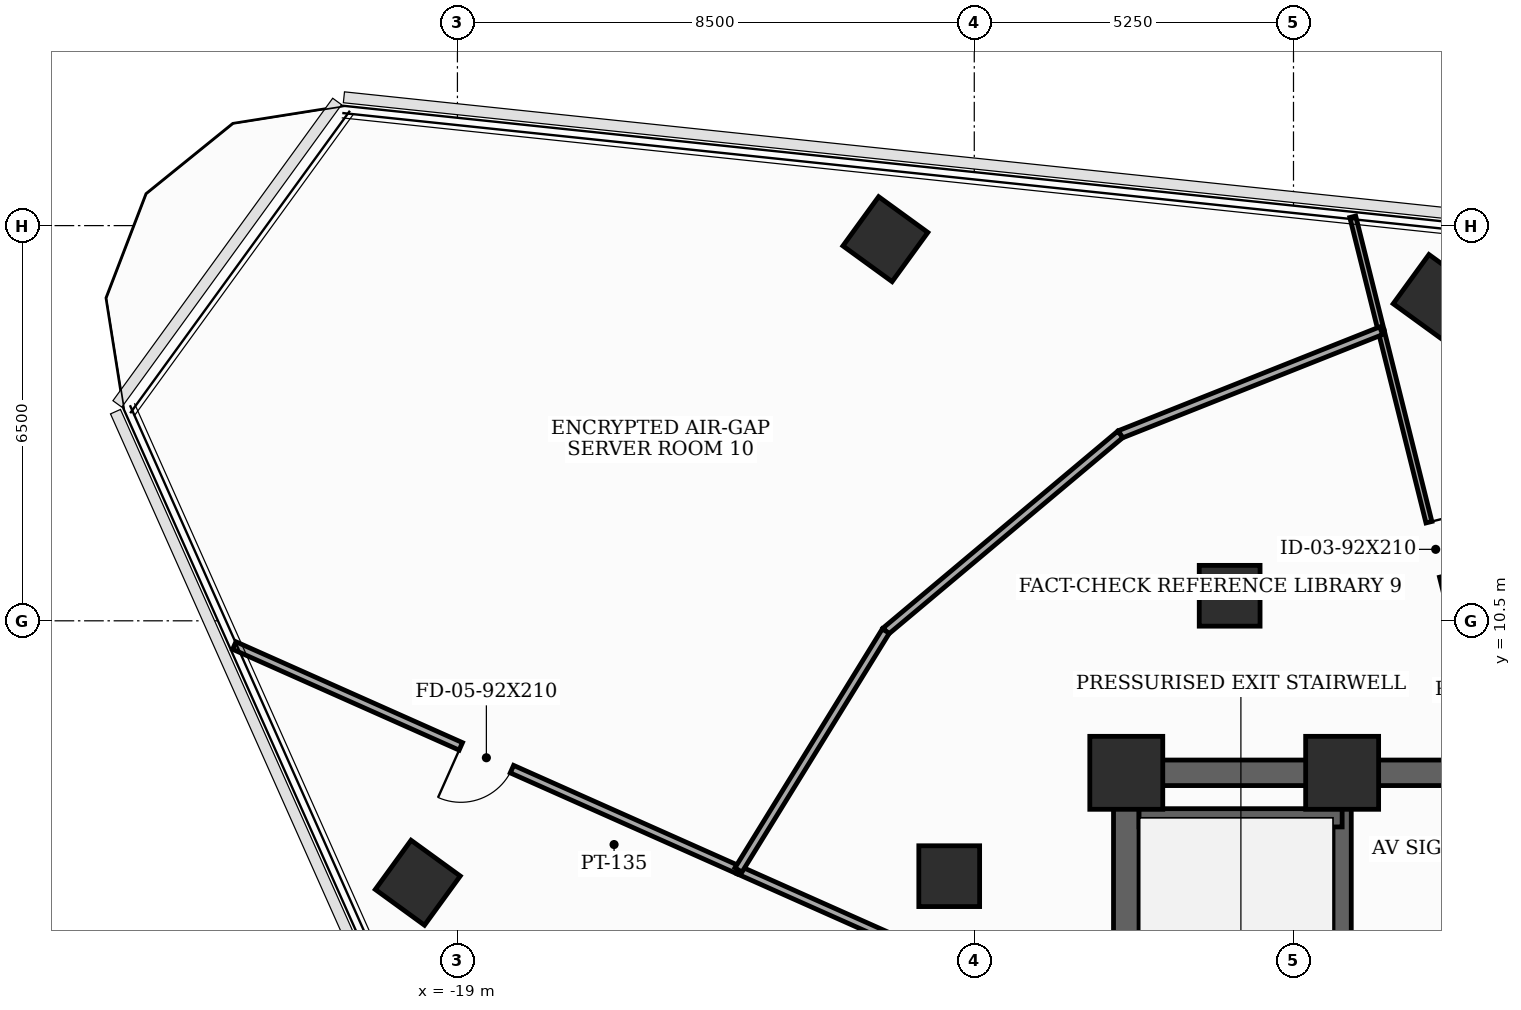
"""IFC4 building model, lengths in metres.
Left out: names, types, materials, properties, quantities, classifications, styles, units other than length and angle.
Written with IfcOpenShell. Run it as: python <this file> out.ifc"""

import sys

from ifc_helpers import new_model, si_unit, direction, frame, frame_2d, origin, origin_2d, place, context, subcontext, project, spatial, rectangle, extrude, element, fill, save


model = new_model("IFC4")
c1 = context("Model", 3, precision=1e-05, world=origin(), true_north=direction((0.0, 1.0)))
c2 = subcontext(c1, "Body", "Model", "MODEL_VIEW")
j1 = project(units=[si_unit("LENGTHUNIT", "METRE"), si_unit("PLANEANGLEUNIT", "RADIAN")], contexts=[c1])
p1 = place(None, origin())
s1 = spatial("IfcSite", under=j1, at=p1, CompositionType="ELEMENT")
p2 = place(p1, origin())
s2 = spatial("IfcBuilding", under=s1, at=p2, CompositionType="ELEMENT")
p3 = place(p2, frame((0.0, 0.0, 237.4)))
s3 = spatial("IfcBuildingStorey", under=s2, at=p3, CompositionType="ELEMENT", Elevation=237.4)
for number, where, z_axis, x_axis in (
    (1, (-4.45, 8.0, 0.0), (0.0, 0.0, 1.0), (1.0, 0.0, 0.0)),
    (2, (-8.0, 8.0, 0.0), (0.0, 0.0, 1.0), (1.0, 0.0, 0.0)),
):
    element("IfcColumn", number, at=place(p3, frame(where, z_axis=z_axis, x_axis=x_axis)), inside=s3, PredefinedType="COLUMN", context=c2, shape_type="SweptSolid", body=[
        extrude(rectangle(XDim=1.2, YDim=1.2, at=origin_2d()), origin(), (0.0, 0.0, 1.0), 3.7),
    ])
for number, where, z_axis, x_axis in (
    (3, (-6.3, 10.912, 0.0), (0.0, 0.0, 1.0), (1.0, 0.0, 0.0)),
    (4, (-10.912, 6.3, 0.0), (0.0, 0.0, 1.0), (1.0, 0.0, 0.0)),
    (5, (-2.912, 15.826, 0.0), (0.0, 0.0, 1.0), (0.588, 0.809, 0.0)),
    (6, (-11.962, 16.777, 0.0), (0.0, 0.0, 1.0), (0.588, 0.809, 0.0)),
    (7, (-19.652, 6.192, 0.0), (0.0, 0.0, 1.0), (0.588, 0.809, 0.0)),
):
    element("IfcColumn", number, at=place(p3, frame(where, z_axis=z_axis, x_axis=x_axis)), inside=s3, PredefinedType="COLUMN", context=c2, shape_type="SweptSolid", body=[
        extrude(rectangle(XDim=1.0, YDim=1.0, at=origin_2d()), origin(), (0.0, 0.0, 1.0), 3.7),
    ])
p4 = place(p3, frame((-8.0, -8.0, 0.0), z_axis=(0.0, 0.0, 1.0), x_axis=(0.0, 1.0, 0.0)))
e8 = element("IfcWall", 8, at=p4, inside=s3, PredefinedType="SHEAR", context=c2, shape_type="SweptSolid", body=[
    extrude(rectangle(XDim=16.0, YDim=0.42, at=frame_2d((8.0, 0.0))), origin(), (0.0, 0.0, 1.0), 3.5),
])
p5 = place(p4, frame((0.761, 0.0, 0.0)))
e9 = element("IfcOpeningElement", 9, at=p5, cuts=e8, PredefinedType="OPENING", context=c2, shape_type="SweptSolid", body=[
    extrude(rectangle(XDim=0.85, YDim=2.02, at=frame_2d((0.425, 1.01))), frame((0.0, 0.22, 0.0), z_axis=(0.0, -1.0, 0.0), x_axis=(1.0, 0.0, 0.0)), (0.0, 0.0, 1.0), 0.44),
])
p6 = place(p4, frame((5.35, 0.0, 0.0)))
e10 = element("IfcOpeningElement", 10, at=p6, cuts=e8, PredefinedType="OPENING", context=c2, shape_type="SweptSolid", body=[
    extrude(rectangle(XDim=1.05, YDim=2.15, at=frame_2d((0.525, 1.075))), frame((0.0, 0.22, 0.0), z_axis=(0.0, -1.0, 0.0), x_axis=(1.0, 0.0, 0.0)), (0.0, 0.0, 1.0), 0.44),
])
p7 = place(p3, frame((-8.0, 8.0, 0.0), z_axis=(0.0, 0.0, 1.0), x_axis=(1.0, 0.0, 0.0)))
e11 = element("IfcWall", 11, at=p7, inside=s3, PredefinedType="SHEAR", context=c2, shape_type="SweptSolid", body=[
    extrude(rectangle(XDim=16.0, YDim=0.42, at=frame_2d((8.0, 0.0))), origin(), (0.0, 0.0, 1.0), 3.5),
])
p8 = place(p7, frame((7.1, 0.0, 0.0)))
e12 = element("IfcOpeningElement", 12, at=p8, cuts=e11, PredefinedType="OPENING", context=c2, shape_type="SweptSolid", body=[
    extrude(rectangle(XDim=1.8, YDim=2.15, at=frame_2d((0.9, 1.075))), frame((0.0, 0.22, 0.0), z_axis=(0.0, -1.0, 0.0), x_axis=(1.0, 0.0, 0.0)), (0.0, 0.0, 1.0), 0.44),
])
p9 = place(p3, frame((-4.45, -7.79, 0.0), z_axis=(0.0, 0.0, 1.0), x_axis=(0.0, 1.0, 0.0)))
e13 = element("IfcWall", 13, at=p9, inside=s3, PredefinedType="SHEAR", context=c2, shape_type="SweptSolid", body=[
    extrude(rectangle(XDim=15.58, YDim=0.3, at=frame_2d((7.79, 0.0))), origin(), (0.0, 0.0, 1.0), 3.5),
])
p10 = place(p3, frame((-7.79, 7.26, 0.0), z_axis=(0.0, 0.0, 1.0), x_axis=(1.0, 0.0, 0.0)))
e14 = element("IfcWall", 14, at=p10, inside=s3, PredefinedType="SHEAR", context=c2, shape_type="SweptSolid", body=[
    extrude(rectangle(XDim=3.34, YDim=0.3, at=frame_2d((1.67, 0.0))), origin(), (0.0, 0.0, 1.0), 3.5),
])
p11 = place(p3, frame((-8.08, 3.597, 0.0), z_axis=(0.0, 0.0, 1.0), x_axis=(-0.913494385598, 0.40685133339, 0.0)))
e15 = element("IfcWall", 15, at=p11, inside=s3, PredefinedType="PARTITIONING", context=c2, shape_type="SweptSolid", body=[
    extrude(rectangle(XDim=6.894, YDim=0.135, at=frame_2d((3.447, 0.0))), origin(), (0.0, 0.0, 1.0), 2.885),
])
p12 = place(p3, frame((-14.378, 6.402, 0.0), z_axis=(0.0, 0.0, 1.0), x_axis=(-0.913562917951, 0.406697424315, 0.0)))
e16 = element("IfcWall", 16, at=p12, inside=s3, PredefinedType="PARTITIONING", context=c2, shape_type="SweptSolid", body=[
    extrude(rectangle(XDim=9.077, YDim=0.135, at=frame_2d((4.538, 0.0))), origin(), (0.0, 0.0, 1.0), 2.985),
])
p13 = place(p12, frame((4.078, 0.0, 0.0)))
e17 = element("IfcOpeningElement", 17, at=p13, cuts=e16, PredefinedType="OPENING", context=c2, shape_type="SweptSolid", body=[
    extrude(rectangle(XDim=0.92, YDim=2.1, at=frame_2d((0.46, 1.05))), frame((0.0, 0.077, 0.0), z_axis=(0.0, -1.0, 0.0), x_axis=(1.0, 0.0, 0.0)), (0.0, 0.0, 1.0), 0.155),
])
p14 = place(p3, frame((-3.808, 15.271, 0.0), z_axis=(0.0, 0.0, 1.0), x_axis=(0.241993010569, -0.970277992555, 0.0)))
e18 = element("IfcWall", 18, at=p14, inside=s3, PredefinedType="MOVABLE", context=c2, shape_type="SweptSolid", body=[
    extrude(rectangle(XDim=7.411, YDim=0.1, at=frame_2d((3.706, 0.0))), origin(), (0.0, 0.0, 1.0), 2.885),
])
p15 = place(p14, frame((3.246, 0.0, 0.0)))
e19 = element("IfcOpeningElement", 19, at=p15, cuts=e18, PredefinedType="OPENING", context=c2, shape_type="SweptSolid", body=[
    extrude(rectangle(XDim=0.92, YDim=2.1, at=frame_2d((0.46, 1.05))), frame((0.0, 0.06, 0.0), z_axis=(0.0, -1.0, 0.0), x_axis=(1.0, 0.0, 0.0)), (0.0, 0.0, 1.0), 0.12),
])
p16 = place(p3, frame((-4.275, 17.146, 0.0), z_axis=(0.0, 0.0, 1.0), x_axis=(0.241881394388, -0.970305823464, 0.0)))
e20 = element("IfcWall", 20, at=p16, inside=s3, PredefinedType="MOVABLE", context=c2, shape_type="SweptSolid", body=[
    extrude(rectangle(XDim=1.932, YDim=0.1, at=frame_2d((0.966, 0.0))), origin(), (0.0, 0.0, 1.0), 3.035),
])
p17 = place(p3, frame((-3.808, 15.271, 0.0), z_axis=(0.0, 0.0, 1.0), x_axis=(-0.929356809345, -0.369182774414, 0.0)))
e21 = element("IfcWall", 21, at=p17, inside=s3, PredefinedType="PARTITIONING", context=c2, shape_type="SweptSolid", body=[
    extrude(rectangle(XDim=4.616, YDim=0.135, at=frame_2d((2.308, 0.0))), origin(), (0.0, 0.0, 1.0), 3.5),
])
p18 = place(p3, frame((-8.098, 13.567, 0.0), z_axis=(0.0, 0.0, 1.0), x_axis=(-0.766114520239, -0.642704085781, 0.0)))
e22 = element("IfcWall", 22, at=p18, inside=s3, PredefinedType="PARTITIONING", context=c2, shape_type="SweptSolid", body=[
    extrude(rectangle(XDim=5.035, YDim=0.135, at=frame_2d((2.517, 0.0))), origin(), (0.0, 0.0, 1.0), 2.985),
])
p19 = place(p3, frame((-11.955, 10.331, 0.0), z_axis=(0.0, 0.0, 1.0), x_axis=(-0.524888064347, -0.851171263557, 0.0)))
e23 = element("IfcWall", 23, at=p19, inside=s3, PredefinedType="PARTITIONING", context=c2, shape_type="SweptSolid", body=[
    extrude(rectangle(XDim=4.616, YDim=0.135, at=frame_2d((2.308, 0.0))), origin(), (0.0, 0.0, 1.0), 2.985),
])
p20 = place(p13, origin())
e24 = element("IfcDoor", 24, at=p20, inside=s3, OperationType="SINGLE_SWING_RIGHT", PredefinedType="DOOR", context=c2, shape_type="SweptSolid", body=[
    extrude(rectangle(XDim=0.92, YDim=2.1, at=frame_2d((0.46, 1.05))), frame((0.0, 0.025, 0.0), z_axis=(0.0, -1.0, 0.0), x_axis=(1.0, 0.0, 0.0)), (0.0, 0.0, 1.0), 0.05),
])
fill(e17, e24)
p21 = place(p15, origin())
e25 = element("IfcDoor", 25, at=p21, inside=s3, OperationType="SINGLE_SWING_LEFT", PredefinedType="DOOR", context=c2, shape_type="SweptSolid", body=[
    extrude(rectangle(XDim=0.92, YDim=2.1, at=frame_2d((0.46, 1.05))), frame((0.0, 0.025, 0.0), z_axis=(0.0, -1.0, 0.0), x_axis=(1.0, 0.0, 0.0)), (0.0, 0.0, 1.0), 0.05),
])
fill(e19, e25)
save(model, sys.argv[1])
